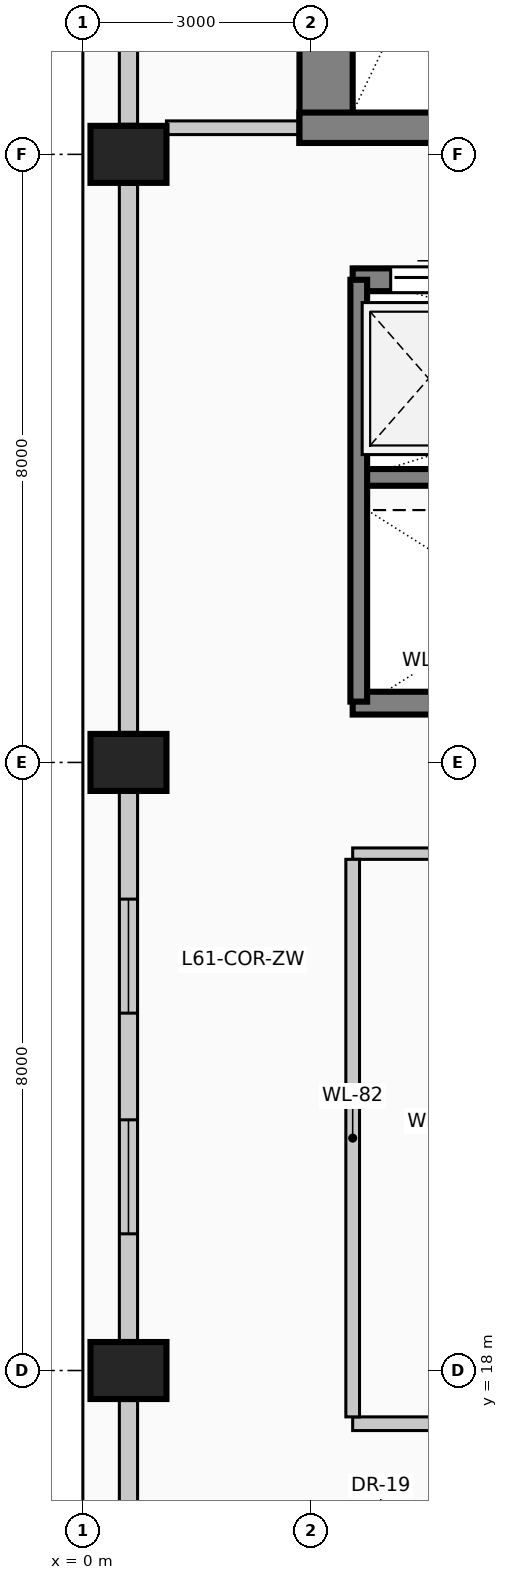
"""IFC4 building model, lengths in metres.
Left out: names, types, materials, properties, quantities, classifications, styles, units other than length and angle.
Written with IfcOpenShell. Run it as: python <this file> out.ifc"""

import sys

from ifc_helpers import new_model, si_unit, direction, frame, frame_2d, origin, origin_2d, place, context, subcontext, project, spatial, rectangle, extrude, element, fill, save


model = new_model("IFC4")
c1 = context("Model", 3, precision=1e-05, world=origin(), true_north=direction((0.0, 1.0)))
c2 = subcontext(c1, "Body", "Model", "MODEL_VIEW")
j1 = project(units=[si_unit("LENGTHUNIT", "METRE"), si_unit("PLANEANGLEUNIT", "RADIAN")], contexts=[c1])
p1 = place(None, origin())
s1 = spatial("IfcSite", under=j1, at=p1, CompositionType="ELEMENT")
p2 = place(p1, origin())
s2 = spatial("IfcBuilding", under=s1, at=p2, CompositionType="ELEMENT")
p3 = place(p2, frame((0.0, 0.0, 252.6)))
s3 = spatial("IfcBuildingStorey", under=s2, at=p3, CompositionType="ELEMENT", Elevation=252.6)
p4 = place(p3, frame((3.2, 34.15, 0.0), z_axis=(0.0, 0.0, 1.0), x_axis=(0.0, 1.0, 0.0)))
e1 = element("IfcWall", 1, at=p4, inside=s3, PredefinedType="SHEAR", context=c2, shape_type="SweptSolid", body=[
    extrude(rectangle(XDim=8.98, YDim=0.7, at=frame_2d((4.49, 0.0))), origin(), (0.0, 0.0, 1.0), 4.0),
])
p5 = place(p3, frame((2.85, 34.35, 0.0), z_axis=(0.0, 0.0, 1.0), x_axis=(1.0, 0.0, 0.0)))
e2 = element("IfcWall", 2, at=p5, inside=s3, PredefinedType="SHEAR", context=c2, shape_type="SweptSolid", body=[
    extrude(rectangle(XDim=4.86, YDim=0.4, at=frame_2d((2.43, 0.0))), origin(), (0.0, 0.0, 1.0), 4.0),
])
p6 = place(p5, frame((2.4, 0.0, 0.0)))
e3 = element("IfcOpeningElement", 3, at=p6, cuts=e2, PredefinedType="OPENING", context=c2, shape_type="SweptSolid", body=[
    extrude(rectangle(XDim=1.15, YDim=2.2, at=frame_2d((0.575, 1.1))), frame((0.0, 0.21, 0.0), z_axis=(0.0, -1.0, 0.0), x_axis=(1.0, 0.0, 0.0)), (0.0, 0.0, 1.0), 0.42),
])
for number, where, z_axis, x_axis in (
    (4, (0.6, 18.0, 0.0), (0.0, 0.0, 1.0), (0.0, 1.0, 0.0)),
    (5, (0.6, 26.0, 0.0), (0.0, 0.0, 1.0), (0.0, 1.0, 0.0)),
    (6, (0.6, 34.0, 0.0), (0.0, 0.0, 1.0), (0.0, 1.0, 0.0)),
):
    element("IfcColumn", number, at=place(p3, frame(where, z_axis=z_axis, x_axis=x_axis)), inside=s3, PredefinedType="COLUMN", context=c2, shape_type="SweptSolid", body=[
        extrude(rectangle(XDim=0.75, YDim=1.0, at=origin_2d()), origin(), (0.0, 0.0, 1.0), 4.0),
    ])
p7 = place(p3, frame((0.6, 10.395, 0.0), z_axis=(0.0, 0.0, 1.0), x_axis=(0.0, 1.0, 0.0)))
e7 = element("IfcWall", 7, at=p7, inside=s3, PredefinedType="SOLIDWALL", context=c2, shape_type="SweptSolid", body=[
    extrude(rectangle(XDim=7.21, YDim=0.24, at=frame_2d((3.605, 0.0))), origin(), (0.0, 0.0, 1.0), 3.0),
])
p8 = place(p7, frame((1.403, 0.0, 0.42)))
e8 = element("IfcOpeningElement", 8, at=p8, cuts=e7, PredefinedType="OPENING", context=c2, shape_type="SweptSolid", body=[
    extrude(rectangle(XDim=1.5, YDim=2.2, at=frame_2d((0.75, 1.1))), frame((0.0, 0.13, 0.0), z_axis=(0.0, -1.0, 0.0), x_axis=(1.0, 0.0, 0.0)), (0.0, 0.0, 1.0), 0.26),
])
p9 = place(p3, frame((0.6, 18.395, 0.0), z_axis=(0.0, 0.0, 1.0), x_axis=(0.0, 1.0, 0.0)))
e9 = element("IfcWall", 9, at=p9, inside=s3, PredefinedType="SOLIDWALL", context=c2, shape_type="SweptSolid", body=[
    extrude(rectangle(XDim=7.21, YDim=0.24, at=frame_2d((3.605, 0.0))), origin(), (0.0, 0.0, 1.0), 3.0),
])
p10 = place(p9, frame((1.403, 0.0, 0.42)))
e10 = element("IfcOpeningElement", 10, at=p10, cuts=e9, PredefinedType="OPENING", context=c2, shape_type="SweptSolid", body=[
    extrude(rectangle(XDim=1.5, YDim=2.2, at=frame_2d((0.75, 1.1))), frame((0.0, 0.13, 0.0), z_axis=(0.0, -1.0, 0.0), x_axis=(1.0, 0.0, 0.0)), (0.0, 0.0, 1.0), 0.26),
])
p11 = place(p9, frame((4.307, 0.0, 0.42)))
e11 = element("IfcOpeningElement", 11, at=p11, cuts=e9, PredefinedType="OPENING", context=c2, shape_type="SweptSolid", body=[
    extrude(rectangle(XDim=1.5, YDim=2.2, at=frame_2d((0.75, 1.1))), frame((0.0, 0.13, 0.0), z_axis=(0.0, -1.0, 0.0), x_axis=(1.0, 0.0, 0.0)), (0.0, 0.0, 1.0), 0.26),
])
p12 = place(p3, frame((0.6, 26.395, 0.0), z_axis=(0.0, 0.0, 1.0), x_axis=(0.0, 1.0, 0.0)))
e12 = element("IfcWall", 12, at=p12, inside=s3, PredefinedType="SOLIDWALL", context=c2, shape_type="SweptSolid", body=[
    extrude(rectangle(XDim=7.21, YDim=0.24, at=frame_2d((3.605, 0.0))), origin(), (0.0, 0.0, 1.0), 3.0),
])
p13 = place(p3, frame((0.6, 34.395, 0.0), z_axis=(0.0, 0.0, 1.0), x_axis=(0.0, 1.0, 0.0)))
e13 = element("IfcWall", 13, at=p13, inside=s3, PredefinedType="SOLIDWALL", context=c2, shape_type="SweptSolid", body=[
    extrude(rectangle(XDim=7.61, YDim=0.24, at=frame_2d((3.805, 0.0))), origin(), (0.0, 0.0, 1.0), 3.0),
])
p14 = place(p3, frame((3.55, 32.35, 0.0), z_axis=(0.0, 0.0, 1.0), x_axis=(1.0, 0.0, 0.0)))
e14 = element("IfcWall", 14, at=p14, inside=s3, PredefinedType="SOLIDWALL", context=c2, shape_type="SweptSolid", body=[
    extrude(rectangle(XDim=2.1, YDim=0.3, at=frame_2d((1.05, 0.0))), origin(), (0.0, 0.0, 1.0), 4.0),
])
p15 = place(p14, frame((0.5, 0.0, 0.0)))
e15 = element("IfcOpeningElement", 15, at=p15, cuts=e14, PredefinedType="OPENING", context=c2, shape_type="SweptSolid", body=[
    extrude(rectangle(XDim=1.1, YDim=2.2, at=frame_2d((0.55, 1.1))), frame((0.0, 0.16, 0.0), z_axis=(0.0, -1.0, 0.0), x_axis=(1.0, 0.0, 0.0)), (0.0, 0.0, 1.0), 0.32),
])
p16 = place(p3, frame((5.65, 26.78, 0.0), z_axis=(0.0, 0.0, 1.0), x_axis=(-1.0, 0.0, 0.0)))
e16 = element("IfcWall", 16, at=p16, inside=s3, PredefinedType="SOLIDWALL", context=c2, shape_type="SweptSolid", body=[
    extrude(rectangle(XDim=2.1, YDim=0.3, at=frame_2d((1.05, 0.0))), origin(), (0.0, 0.0, 1.0), 4.0),
])
p17 = place(p3, frame((3.55, 29.75, 0.0), z_axis=(0.0, 0.0, 1.0), x_axis=(1.0, 0.0, 0.0)))
e17 = element("IfcWall", 17, at=p17, inside=s3, PredefinedType="SOLIDWALL", context=c2, shape_type="SweptSolid", body=[
    extrude(rectangle(XDim=8.65, YDim=0.22, at=frame_2d((4.325, 0.0))), origin(), (0.0, 0.0, 1.0), 4.0),
])
p18 = place(p3, frame((3.63, 26.8, 0.0), z_axis=(0.0, 0.0, 1.0), x_axis=(0.0, 1.0, 0.0)))
e18 = element("IfcWall", 18, at=p18, inside=s3, PredefinedType="SOLIDWALL", context=c2, shape_type="SweptSolid", body=[
    extrude(rectangle(XDim=5.55, YDim=0.22, at=frame_2d((2.775, 0.0))), origin(), (0.0, 0.0, 1.0), 4.0),
])
p19 = place(p3, frame((3.55, 17.3, 0.0), z_axis=(0.0, 0.0, 1.0), x_axis=(1.0, 0.0, 0.0)))
e19 = element("IfcWall", 19, at=p19, inside=s3, PredefinedType="PARTITIONING", context=c2, shape_type="SweptSolid", body=[
    extrude(rectangle(XDim=6.25, YDim=0.18, at=frame_2d((3.125, 0.0))), origin(), (0.0, 0.0, 1.0), 3.75),
])
p20 = place(p19, frame((2.65, 0.0, 0.0)))
e20 = element("IfcOpeningElement", 20, at=p20, cuts=e19, PredefinedType="OPENING", context=c2, shape_type="SweptSolid", body=[
    extrude(rectangle(XDim=0.95, YDim=2.15, at=frame_2d((0.475, 1.075))), frame((0.0, 0.1, 0.0), z_axis=(0.0, -1.0, 0.0), x_axis=(1.0, 0.0, 0.0)), (0.0, 0.0, 1.0), 0.2),
])
p21 = place(p3, frame((3.55, 24.8, 0.0), z_axis=(0.0, 0.0, 1.0), x_axis=(1.0, 0.0, 0.0)))
e21 = element("IfcWall", 21, at=p21, inside=s3, PredefinedType="PARTITIONING", context=c2, shape_type="SweptSolid", body=[
    extrude(rectangle(XDim=6.25, YDim=0.15, at=frame_2d((3.125, 0.0))), origin(), (0.0, 0.0, 1.0), 3.75),
])
p22 = place(p3, frame((1.1, 34.35, 0.0), z_axis=(0.0, 0.0, 1.0), x_axis=(1.0, 0.0, 0.0)))
e22 = element("IfcWall", 22, at=p22, inside=s3, PredefinedType="PARTITIONING", context=c2, shape_type="SweptSolid", body=[
    extrude(rectangle(XDim=1.75, YDim=0.18, at=frame_2d((0.875, 0.0))), origin(), (0.0, 0.0, 1.0), 3.75),
])
p23 = place(p3, frame((3.55, 17.39, 0.0), z_axis=(0.0, 0.0, 1.0), x_axis=(0.0, 1.0, 0.0)))
e23 = element("IfcWall", 23, at=p23, inside=s3, PredefinedType="PARTITIONING", context=c2, shape_type="SweptSolid", body=[
    extrude(rectangle(XDim=7.335, YDim=0.18, at=frame_2d((3.667, 0.0))), origin(), (0.0, 0.0, 1.0), 3.75),
])
p24 = place(p10, origin())
e24 = element("IfcWindow", 24, at=p24, inside=s3, PartitioningType="SINGLE_PANEL", PredefinedType="WINDOW", context=c2, shape_type="SweptSolid", body=[
    extrude(rectangle(XDim=1.5, YDim=2.2, at=frame_2d((0.75, 1.1))), frame((0.0, 0.03, 0.0), z_axis=(0.0, -1.0, 0.0), x_axis=(1.0, 0.0, 0.0)), (0.0, 0.0, 1.0), 0.06),
])
fill(e10, e24)
p25 = place(p11, origin())
e25 = element("IfcWindow", 25, at=p25, inside=s3, PartitioningType="SINGLE_PANEL", PredefinedType="WINDOW", context=c2, shape_type="SweptSolid", body=[
    extrude(rectangle(XDim=1.5, YDim=2.2, at=frame_2d((0.75, 1.1))), frame((0.0, 0.03, 0.0), z_axis=(0.0, -1.0, 0.0), x_axis=(1.0, 0.0, 0.0)), (0.0, 0.0, 1.0), 0.06),
])
fill(e11, e25)
p26 = place(p15, origin())
e26 = element("IfcDoor", 26, at=p26, inside=s3, OperationType="SLIDING_TO_LEFT", PredefinedType="DOOR", context=c2, shape_type="SweptSolid", body=[
    extrude(rectangle(XDim=1.1, YDim=2.2, at=frame_2d((0.55, 1.1))), frame((0.0, 0.025, 0.0), z_axis=(0.0, -1.0, 0.0), x_axis=(1.0, 0.0, 0.0)), (0.0, 0.0, 1.0), 0.05),
])
fill(e15, e26)
save(model, sys.argv[1])
